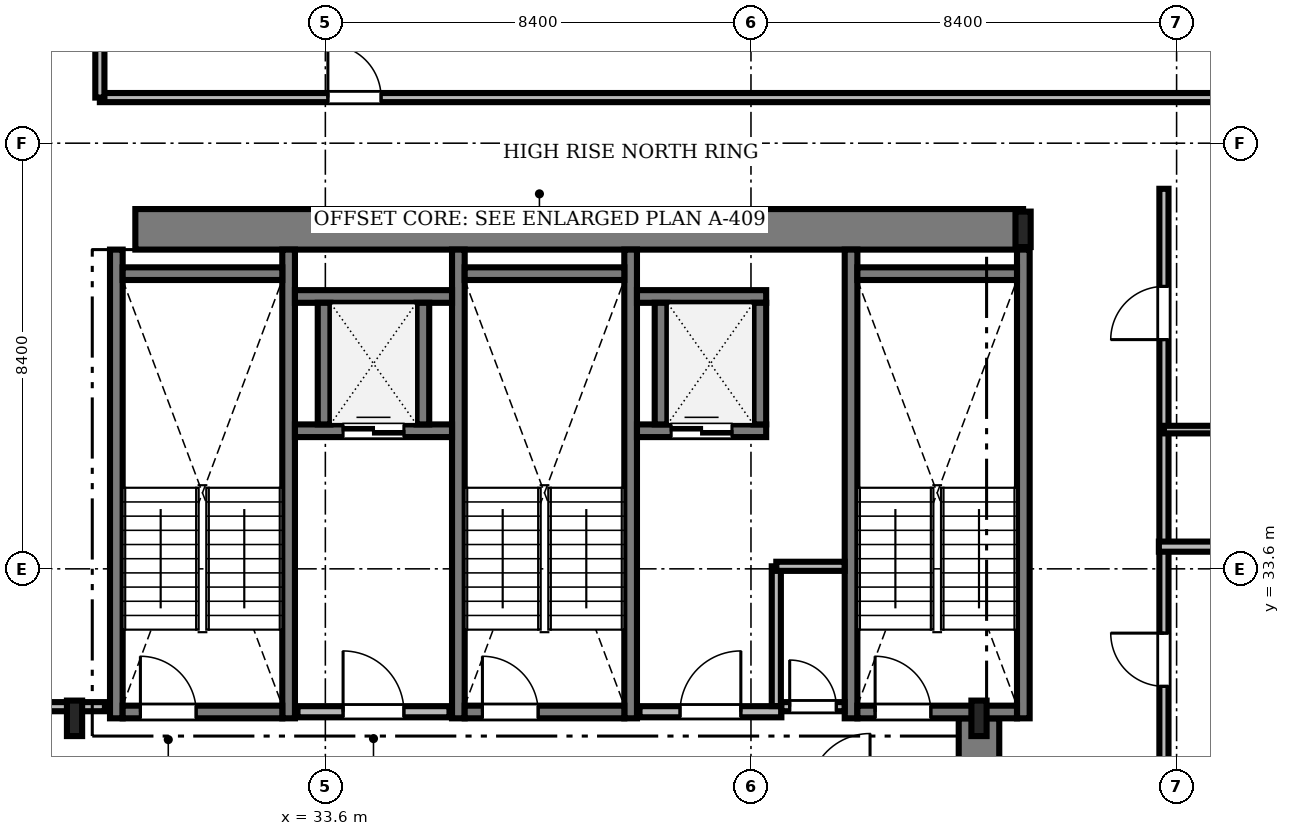
"""IFC4 building model, lengths in metres.
Left out: names, types, materials, properties, quantities, classifications, styles, units other than length and angle.
Written with IfcOpenShell. Run it as: python <this file> out.ifc"""

import sys

from ifc_helpers import new_model, si_unit, direction, frame, frame_2d, origin, origin_2d, place, context, subcontext, project, spatial, rectangle, i_section, extrude, source, transform, mapped, element, fill, save


model = new_model("IFC4")
c1 = context("Model", 3, precision=1e-05, world=origin(), true_north=direction((0.0, 1.0)))
c2 = subcontext(c1, "Body", "Model", "MODEL_VIEW")
j1 = project(units=[si_unit("LENGTHUNIT", "METRE"), si_unit("PLANEANGLEUNIT", "RADIAN")], contexts=[c1])
p1 = place(None, origin())
s1 = spatial("IfcSite", under=j1, at=p1, CompositionType="ELEMENT")
p2 = place(p1, origin())
s2 = spatial("IfcBuilding", under=s1, at=p2, CompositionType="ELEMENT")
p3 = place(p2, frame((0.0, 0.0, 211.05)))
s3 = spatial("IfcBuildingStorey", under=s2, at=p3, CompositionType="ELEMENT", Elevation=211.05)
m1 = source(origin(), c2, "Body", "SweptSolid", [
    extrude(rectangle(XDim=17.52, YDim=0.8, at=frame_2d((8.76, 0.0))), origin(), (0.0, 0.0, 1.0), 3.53),
])
p4 = place(p3, frame((29.85, 40.3, 0.0), z_axis=(0.0, 0.0, 1.0), x_axis=(1.0, 0.0, 0.0)))
e1 = element("IfcWall", 1, at=p4, inside=s3, PredefinedType="SHEAR", context=c2, shape_type="MappedRepresentation", body=[
    mapped(m1, transform((0.0, 0.0, 0.0), scale=1.0)),
])
m2 = source(origin(), c2, "Body", "SweptSolid", [
    extrude(rectangle(XDim=13.15, YDim=0.8, at=frame_2d((6.575, 0.0))), origin(), (0.0, 0.0, 1.0), 3.53),
])
p5 = place(p3, frame((46.5, 17.5, 0.0), z_axis=(0.0, 0.0, 1.0), x_axis=(0.0, 1.0, 0.0)))
e2 = element("IfcWall", 2, at=p5, inside=s3, PredefinedType="SHEAR", context=c2, shape_type="MappedRepresentation", body=[
    mapped(m2, transform((0.0, 0.0, 0.0), scale=1.0)),
])
m3 = source(origin(), c2, "Body", "SweptSolid", [
    extrude(i_section(OverallWidth=0.3, OverallDepth=0.7, WebThickness=0.017, FlangeThickness=0.032, FilletRadius=0.027, at=origin_2d()), origin(), (0.0, 0.0, 1.0), 3.53),
])
for number, where, z_axis, x_axis in (
    (3, (28.65, 30.65, 0.0), (0.0, 0.0, 1.0), (1.0, 0.0, 0.0)),
    (4, (46.5, 30.65, 0.0), (0.0, 0.0, 1.0), (1.0, 0.0, 0.0)),
    (5, (47.37, 40.3, 0.0), (0.0, 0.0, 1.0), (1.0, 0.0, 0.0)),
):
    element("IfcColumn", number, at=place(p3, frame(where, z_axis=z_axis, x_axis=x_axis)), inside=s3, PredefinedType="COLUMN", context=c2, shape_type="MappedRepresentation", body=[
        mapped(m3, transform((0.0, 0.0, 0.0), scale=1.0)),
    ])
m4 = source(origin(), c2, "Body", "SweptSolid", [
    extrude(rectangle(XDim=9.25, YDim=0.25, at=frame_2d((4.625, 0.0))), origin(), (0.0, 0.0, 1.0), 3.55),
])
for number, where, z_axis, x_axis in (
    (6, (29.475, 30.65, 0.0), (0.0, 0.0, 1.0), (0.0, 1.0, 0.0)),
    (7, (32.875, 30.65, 0.0), (0.0, 0.0, 1.0), (0.0, 1.0, 0.0)),
):
    element("IfcWall", number, at=place(p3, frame(where, z_axis=z_axis, x_axis=x_axis)), inside=s3, PredefinedType="SOLIDWALL", context=c2, shape_type="MappedRepresentation", body=[
        mapped(m4, transform((0.0, 0.0, 0.0), scale=1.0)),
    ])
m5 = source(origin(), c2, "Body", "SweptSolid", [
    extrude(rectangle(XDim=3.15, YDim=0.25, at=frame_2d((1.575, 0.0))), origin(), (0.0, 0.0, 1.0), 3.55),
])
p6 = place(p3, frame((29.6, 39.425, 0.0), z_axis=(0.0, 0.0, 1.0), x_axis=(1.0, 0.0, 0.0)))
e8 = element("IfcWall", 8, at=p6, inside=s3, PredefinedType="SOLIDWALL", context=c2, shape_type="MappedRepresentation", body=[
    mapped(m5, transform((0.0, 0.0, 0.0), scale=1.0)),
])
p7 = place(p3, frame((29.6, 30.775, 0.0), z_axis=(0.0, 0.0, 1.0), x_axis=(1.0, 0.0, 0.0)))
e9 = element("IfcWall", 9, at=p7, inside=s3, PredefinedType="SOLIDWALL", context=c2, shape_type="MappedRepresentation", body=[
    mapped(m5, transform((0.0, 0.0, 0.0), scale=1.0)),
])
m6 = source(origin(), c2, "Body", "SweptSolid", [
    extrude(rectangle(XDim=1.1, YDim=2.2, at=frame_2d((0.55, 1.1))), frame((0.0, 0.135, 0.0), z_axis=(0.0, -1.0, 0.0), x_axis=(1.0, 0.0, 0.0)), (0.0, 0.0, 1.0), 0.27),
])
p8 = place(p7, frame((0.35, 0.0, 0.0)))
e10 = element("IfcOpeningElement", 10, at=p8, cuts=e9, PredefinedType="OPENING", context=c2, shape_type="MappedRepresentation", body=[
    mapped(m6, transform((0.0, 0.0, 0.0), scale=1.0)),
])
for number, where, z_axis, x_axis in (
    (11, (36.225, 30.65, 0.0), (0.0, 0.0, 1.0), (0.0, 1.0, 0.0)),
    (12, (39.625, 30.65, 0.0), (0.0, 0.0, 1.0), (0.0, 1.0, 0.0)),
):
    element("IfcWall", number, at=place(p3, frame(where, z_axis=z_axis, x_axis=x_axis)), inside=s3, PredefinedType="SOLIDWALL", context=c2, shape_type="MappedRepresentation", body=[
        mapped(m4, transform((0.0, 0.0, 0.0), scale=1.0)),
    ])
p9 = place(p3, frame((36.35, 39.425, 0.0), z_axis=(0.0, 0.0, 1.0), x_axis=(1.0, 0.0, 0.0)))
e13 = element("IfcWall", 13, at=p9, inside=s3, PredefinedType="SOLIDWALL", context=c2, shape_type="MappedRepresentation", body=[
    mapped(m5, transform((0.0, 0.0, 0.0), scale=1.0)),
])
p10 = place(p3, frame((36.35, 30.775, 0.0), z_axis=(0.0, 0.0, 1.0), x_axis=(1.0, 0.0, 0.0)))
e14 = element("IfcWall", 14, at=p10, inside=s3, PredefinedType="SOLIDWALL", context=c2, shape_type="MappedRepresentation", body=[
    mapped(m5, transform((0.0, 0.0, 0.0), scale=1.0)),
])
p11 = place(p10, frame((0.35, 0.0, 0.0)))
e15 = element("IfcOpeningElement", 15, at=p11, cuts=e14, PredefinedType="OPENING", context=c2, shape_type="MappedRepresentation", body=[
    mapped(m6, transform((0.0, 0.0, 0.0), scale=1.0)),
])
for number, where, z_axis, x_axis in (
    (16, (43.975, 30.65, 0.0), (0.0, 0.0, 1.0), (0.0, 1.0, 0.0)),
    (17, (47.375, 30.65, 0.0), (0.0, 0.0, 1.0), (0.0, 1.0, 0.0)),
):
    element("IfcWall", number, at=place(p3, frame(where, z_axis=z_axis, x_axis=x_axis)), inside=s3, PredefinedType="SOLIDWALL", context=c2, shape_type="MappedRepresentation", body=[
        mapped(m4, transform((0.0, 0.0, 0.0), scale=1.0)),
    ])
p12 = place(p3, frame((44.1, 39.425, 0.0), z_axis=(0.0, 0.0, 1.0), x_axis=(1.0, 0.0, 0.0)))
e18 = element("IfcWall", 18, at=p12, inside=s3, PredefinedType="SOLIDWALL", context=c2, shape_type="MappedRepresentation", body=[
    mapped(m5, transform((0.0, 0.0, 0.0), scale=1.0)),
])
p13 = place(p3, frame((44.1, 30.775, 0.0), z_axis=(0.0, 0.0, 1.0), x_axis=(1.0, 0.0, 0.0)))
e19 = element("IfcWall", 19, at=p13, inside=s3, PredefinedType="SOLIDWALL", context=c2, shape_type="MappedRepresentation", body=[
    mapped(m5, transform((0.0, 0.0, 0.0), scale=1.0)),
])
p14 = place(p13, frame((0.35, 0.0, 0.0)))
e20 = element("IfcOpeningElement", 20, at=p14, cuts=e19, PredefinedType="OPENING", context=c2, shape_type="MappedRepresentation", body=[
    mapped(m6, transform((0.0, 0.0, 0.0), scale=1.0)),
])
m7 = source(origin(), c2, "Body", "SweptSolid", [
    extrude(rectangle(XDim=3.0, YDim=0.22, at=frame_2d((1.5, 0.0))), origin(), (0.0, 0.0, 1.0), 3.53),
])
p15 = place(p3, frame((33.05, 30.78, 0.0), z_axis=(0.0, 0.0, 1.0), x_axis=(1.0, 0.0, 0.0)))
e21 = element("IfcWall", 21, at=p15, inside=s3, PredefinedType="SOLIDWALL", context=c2, shape_type="MappedRepresentation", body=[
    mapped(m7, transform((0.0, 0.0, 0.0), scale=1.0)),
])
m8 = source(origin(), c2, "Body", "SweptSolid", [
    extrude(rectangle(XDim=1.2, YDim=2.2, at=frame_2d((0.6, 1.1))), frame((0.0, 0.12, 0.0), z_axis=(0.0, -1.0, 0.0), x_axis=(1.0, 0.0, 0.0)), (0.0, 0.0, 1.0), 0.24),
])
p16 = place(p15, frame((0.9, 0.0, 0.0)))
e22 = element("IfcOpeningElement", 22, at=p16, cuts=e21, PredefinedType="OPENING", context=c2, shape_type="MappedRepresentation", body=[
    mapped(m8, transform((0.0, 0.0, 0.0), scale=1.0)),
])
m9 = source(origin(), c2, "Body", "SweptSolid", [
    extrude(rectangle(XDim=2.8, YDim=0.22, at=frame_2d((1.4, 0.0))), origin(), (0.0, 0.0, 1.0), 3.53),
])
p17 = place(p3, frame((39.8, 30.78, 0.0), z_axis=(0.0, 0.0, 1.0), x_axis=(1.0, 0.0, 0.0)))
e23 = element("IfcWall", 23, at=p17, inside=s3, PredefinedType="SOLIDWALL", context=c2, shape_type="MappedRepresentation", body=[
    mapped(m9, transform((0.0, 0.0, 0.0), scale=1.0)),
])
p18 = place(p17, frame((0.8, 0.0, 0.0)))
e24 = element("IfcOpeningElement", 24, at=p18, cuts=e23, PredefinedType="OPENING", context=c2, shape_type="MappedRepresentation", body=[
    mapped(m8, transform((0.0, 0.0, 0.0), scale=1.0)),
])
m10 = source(origin(), c2, "Body", "SweptSolid", [
    extrude(rectangle(XDim=3.1, YDim=0.25, at=frame_2d((1.55, 0.0))), origin(), (0.0, 0.0, 1.0), 3.53),
])
p19 = place(p3, frame((33.0, 36.325, 0.0), z_axis=(0.0, 0.0, 1.0), x_axis=(1.0, 0.0, 0.0)))
e25 = element("IfcWall", 25, at=p19, inside=s3, PredefinedType="SOLIDWALL", context=c2, shape_type="MappedRepresentation", body=[
    mapped(m10, transform((0.0, 0.0, 0.0), scale=1.0)),
])
m11 = source(origin(), c2, "Body", "SweptSolid", [
    extrude(rectangle(XDim=1.2, YDim=2.25, at=frame_2d((0.6, 1.125))), frame((0.0, 0.135, 0.0), z_axis=(0.0, -1.0, 0.0), x_axis=(1.0, 0.0, 0.0)), (0.0, 0.0, 1.0), 0.27),
])
p20 = place(p19, frame((0.95, 0.0, 0.0)))
e26 = element("IfcOpeningElement", 26, at=p20, cuts=e25, PredefinedType="OPENING", context=c2, shape_type="MappedRepresentation", body=[
    mapped(m11, transform((0.0, 0.0, 0.0), scale=1.0)),
])
p21 = place(p3, frame((33.0, 38.975, 0.0), z_axis=(0.0, 0.0, 1.0), x_axis=(1.0, 0.0, 0.0)))
e27 = element("IfcWall", 27, at=p21, inside=s3, PredefinedType="SOLIDWALL", context=c2, shape_type="MappedRepresentation", body=[
    mapped(m10, transform((0.0, 0.0, 0.0), scale=1.0)),
])
m12 = source(origin(), c2, "Body", "SweptSolid", [
    extrude(rectangle(XDim=2.4, YDim=0.25, at=frame_2d((1.2, 0.0))), origin(), (0.0, 0.0, 1.0), 3.53),
])
for number, where, z_axis, x_axis in (
    (28, (33.575, 36.45, 0.0), (0.0, 0.0, 1.0), (0.0, 1.0, 0.0)),
    (29, (35.525, 36.45, 0.0), (0.0, 0.0, 1.0), (0.0, 1.0, 0.0)),
):
    element("IfcWall", number, at=place(p3, frame(where, z_axis=z_axis, x_axis=x_axis)), inside=s3, PredefinedType="SOLIDWALL", context=c2, shape_type="MappedRepresentation", body=[
        mapped(m12, transform((0.0, 0.0, 0.0), scale=1.0)),
    ])
m13 = source(origin(), c2, "Body", "SweptSolid", [
    extrude(rectangle(XDim=2.55, YDim=0.25, at=frame_2d((1.275, 0.0))), origin(), (0.0, 0.0, 1.0), 3.53),
])
p22 = place(p3, frame((39.75, 36.325, 0.0), z_axis=(0.0, 0.0, 1.0), x_axis=(1.0, 0.0, 0.0)))
e30 = element("IfcWall", 30, at=p22, inside=s3, PredefinedType="SOLIDWALL", context=c2, shape_type="MappedRepresentation", body=[
    mapped(m13, transform((0.0, 0.0, 0.0), scale=1.0)),
])
p23 = place(p22, frame((0.675, 0.0, 0.0)))
e31 = element("IfcOpeningElement", 31, at=p23, cuts=e30, PredefinedType="OPENING", context=c2, shape_type="MappedRepresentation", body=[
    mapped(m11, transform((0.0, 0.0, 0.0), scale=1.0)),
])
p24 = place(p3, frame((39.75, 38.975, 0.0), z_axis=(0.0, 0.0, 1.0), x_axis=(1.0, 0.0, 0.0)))
e32 = element("IfcWall", 32, at=p24, inside=s3, PredefinedType="SOLIDWALL", context=c2, shape_type="MappedRepresentation", body=[
    mapped(m13, transform((0.0, 0.0, 0.0), scale=1.0)),
])
for number, where, z_axis, x_axis in (
    (33, (40.225, 36.45, 0.0), (0.0, 0.0, 1.0), (0.0, 1.0, 0.0)),
    (34, (42.175, 36.45, 0.0), (0.0, 0.0, 1.0), (0.0, 1.0, 0.0)),
):
    element("IfcWall", number, at=place(p3, frame(where, z_axis=z_axis, x_axis=x_axis)), inside=s3, PredefinedType="SOLIDWALL", context=c2, shape_type="MappedRepresentation", body=[
        mapped(m12, transform((0.0, 0.0, 0.0), scale=1.0)),
    ])
m14 = source(origin(), c2, "Body", "SweptSolid", [
    extrude(rectangle(XDim=28.428, YDim=0.18, at=frame_2d((14.214, 0.0))), origin(), (0.0, 0.0, 1.0), 2.772),
])
p25 = place(p3, frame((29.15, 42.9, 0.0), z_axis=(0.0, 0.0, 1.0), x_axis=(1.0, 0.0, 0.0)))
e35 = element("IfcWall", 35, at=p25, inside=s3, PredefinedType="PARTITIONING", context=c2, shape_type="MappedRepresentation", body=[
    mapped(m14, transform((0.0, 0.0, 0.0), scale=1.0)),
])
m15 = source(origin(), c2, "Body", "SweptSolid", [
    extrude(rectangle(XDim=1.05, YDim=2.2, at=frame_2d((0.525, 1.1))), frame((0.0, 0.1, 0.0), z_axis=(0.0, -1.0, 0.0), x_axis=(1.0, 0.0, 0.0)), (0.0, 0.0, 1.0), 0.2),
])
p26 = place(p25, frame((4.5, 0.0, 0.0)))
e36 = element("IfcOpeningElement", 36, at=p26, cuts=e35, PredefinedType="OPENING", context=c2, shape_type="MappedRepresentation", body=[
    mapped(m15, transform((0.0, 0.0, 0.0), scale=1.0)),
])
m16 = source(origin(), c2, "Body", "SweptSolid", [
    extrude(rectangle(XDim=27.59, YDim=0.18, at=frame_2d((13.795, 0.0))), origin(), (0.0, 0.0, 1.0), 2.972),
])
p27 = place(p3, frame((50.15, 13.51, 0.0), z_axis=(0.0, 0.0, 1.0), x_axis=(0.0, 1.0, 0.0)))
e37 = element("IfcWall", 37, at=p27, inside=s3, PredefinedType="PARTITIONING", context=c2, shape_type="MappedRepresentation", body=[
    mapped(m16, transform((0.0, 0.0, 0.0), scale=1.0)),
])
p28 = place(p27, frame((4.086, 0.0, 0.0)))
e38 = element("IfcOpeningElement", 38, at=p28, cuts=e37, PredefinedType="OPENING", context=c2, shape_type="MappedRepresentation", body=[
    mapped(m15, transform((0.0, 0.0, 0.0), scale=1.0)),
])
p29 = place(p27, frame((9.744, 0.0, 0.0)))
e39 = element("IfcOpeningElement", 39, at=p29, cuts=e37, PredefinedType="OPENING", context=c2, shape_type="MappedRepresentation", body=[
    mapped(m15, transform((0.0, 0.0, 0.0), scale=1.0)),
])
p30 = place(p27, frame((17.771, 0.0, 0.0)))
e40 = element("IfcOpeningElement", 40, at=p30, cuts=e37, PredefinedType="OPENING", context=c2, shape_type="MappedRepresentation", body=[
    mapped(m15, transform((0.0, 0.0, 0.0), scale=1.0)),
])
p31 = place(p27, frame((24.614, 0.0, 0.0)))
e41 = element("IfcOpeningElement", 41, at=p31, cuts=e37, PredefinedType="OPENING", context=c2, shape_type="MappedRepresentation", body=[
    mapped(m15, transform((0.0, 0.0, 0.0), scale=1.0)),
])
m17 = source(origin(), c2, "Body", "SweptSolid", [
    extrude(rectangle(XDim=17.828, YDim=0.18, at=frame_2d((8.914, 0.0))), origin(), (0.0, 0.0, 1.0), 2.772),
])
p32 = place(p3, frame((11.422, 30.88, 0.0), z_axis=(0.0, 0.0, 1.0), x_axis=(1.0, 0.0, 0.0)))
e42 = element("IfcWall", 42, at=p32, inside=s3, PredefinedType="PARTITIONING", context=c2, shape_type="MappedRepresentation", body=[
    mapped(m17, transform((0.0, 0.0, 0.0), scale=1.0)),
])
p33 = place(p32, frame((10.778, 0.0, 0.0)))
e43 = element("IfcOpeningElement", 43, at=p33, cuts=e42, PredefinedType="OPENING", context=c2, shape_type="MappedRepresentation", body=[
    mapped(m15, transform((0.0, 0.0, 0.0), scale=1.0)),
])
m18 = source(origin(), c2, "Body", "SweptSolid", [
    extrude(rectangle(XDim=1.248, YDim=0.18, at=frame_2d((0.624, 0.0))), origin(), (0.0, 0.0, 1.0), 3.53),
])
p34 = place(p3, frame((42.6, 30.88, 0.0), z_axis=(0.0, 0.0, 1.0), x_axis=(1.0, 0.0, 0.0)))
e44 = element("IfcWall", 44, at=p34, inside=s3, PredefinedType="PARTITIONING", context=c2, shape_type="MappedRepresentation", body=[
    mapped(m18, transform((0.0, 0.0, 0.0), scale=1.0)),
])
m19 = source(origin(), c2, "Body", "SweptSolid", [
    extrude(rectangle(XDim=0.92, YDim=2.1, at=frame_2d((0.46, 1.05))), frame((0.0, 0.1, 0.0), z_axis=(0.0, -1.0, 0.0), x_axis=(1.0, 0.0, 0.0)), (0.0, 0.0, 1.0), 0.2),
])
p35 = place(p34, frame((0.164, 0.0, 0.0)))
e45 = element("IfcOpeningElement", 45, at=p35, cuts=e44, PredefinedType="OPENING", context=c2, shape_type="MappedRepresentation", body=[
    mapped(m19, transform((0.0, 0.0, 0.0), scale=1.0)),
])
m20 = source(origin(), c2, "Body", "SweptSolid", [
    extrude(rectangle(XDim=7.528, YDim=0.2, at=frame_2d((3.764, 0.0))), origin(), (0.0, 0.0, 1.0), 2.772),
])
p36 = place(p3, frame((50.05, 34.038, 0.0), z_axis=(0.0, 0.0, 1.0), x_axis=(1.0, 0.0, 0.0)))
e46 = element("IfcWall", 46, at=p36, inside=s3, PredefinedType="PARTITIONING", context=c2, shape_type="MappedRepresentation", body=[
    mapped(m20, transform((0.0, 0.0, 0.0), scale=1.0)),
])
m21 = source(origin(), c2, "Body", "SweptSolid", [
    extrude(rectangle(XDim=5.378, YDim=0.18, at=frame_2d((2.689, 0.0))), origin(), (0.0, 0.0, 1.0), 2.772),
])
p37 = place(p3, frame((29.15, 42.9, 0.0), z_axis=(0.0, 0.0, 1.0), x_axis=(0.0, 1.0, 0.0)))
e47 = element("IfcWall", 47, at=p37, inside=s3, PredefinedType="PARTITIONING", context=c2, shape_type="MappedRepresentation", body=[
    mapped(m21, transform((0.0, 0.0, 0.0), scale=1.0)),
])
m22 = source(origin(), c2, "Body", "SweptSolid", [
    extrude(rectangle(XDim=2.758, YDim=0.18, at=frame_2d((1.379, 0.0))), origin(), (0.0, 0.0, 1.0), 3.53),
])
p38 = place(p3, frame((42.5, 30.892, 0.0), z_axis=(0.0, 0.0, 1.0), x_axis=(0.0, 1.0, 0.0)))
e48 = element("IfcWall", 48, at=p38, inside=s3, PredefinedType="PARTITIONING", context=c2, shape_type="MappedRepresentation", body=[
    mapped(m22, transform((0.0, 0.0, 0.0), scale=1.0)),
])
m23 = source(origin(), c2, "Body", "SweptSolid", [
    extrude(rectangle(XDim=2.36, YDim=0.15, at=frame_2d((1.18, 0.0))), origin(), (0.0, 0.0, 1.0), 3.53),
])
p39 = place(p3, frame((50.15, 36.348, 0.0), z_axis=(0.0, 0.0, 1.0), x_axis=(1.0, 0.0, 0.0)))
e49 = element("IfcWall", 49, at=p39, inside=s3, PredefinedType="PARTITIONING", context=c2, shape_type="MappedRepresentation", body=[
    mapped(m23, transform((0.0, 0.0, 0.0), scale=1.0)),
])
m24 = source(origin(), c2, "Body", "SweptSolid", [
    extrude(rectangle(XDim=1.348, YDim=0.18, at=frame_2d((0.674, 0.0))), origin(), (0.0, 0.0, 1.0), 3.53),
])
p40 = place(p3, frame((42.5, 33.65, 0.0), z_axis=(0.0, 0.0, 1.0), x_axis=(1.0, 0.0, 0.0)))
e50 = element("IfcWall", 50, at=p40, inside=s3, PredefinedType="PARTITIONING", context=c2, shape_type="MappedRepresentation", body=[
    mapped(m24, transform((0.0, 0.0, 0.0), scale=1.0)),
])
m25 = source(origin(), c2, "Body", "SweptSolid", [
    extrude(rectangle(XDim=1.1, YDim=2.2, at=frame_2d((0.55, 1.1))), frame((0.0, 0.025, 0.0), z_axis=(0.0, -1.0, 0.0), x_axis=(1.0, 0.0, 0.0)), (0.0, 0.0, 1.0), 0.05),
])
p41 = place(p8, origin())
e51 = element("IfcDoor", 51, at=p41, inside=s3, OperationType="SINGLE_SWING_LEFT", PredefinedType="DOOR", context=c2, shape_type="MappedRepresentation", body=[
    mapped(m25, transform((0.0, 0.0, 0.0), scale=1.0)),
])
fill(e10, e51)
p42 = place(p11, origin())
e52 = element("IfcDoor", 52, at=p42, inside=s3, OperationType="SINGLE_SWING_LEFT", PredefinedType="DOOR", context=c2, shape_type="MappedRepresentation", body=[
    mapped(m25, transform((0.0, 0.0, 0.0), scale=1.0)),
])
fill(e15, e52)
p43 = place(p14, origin())
e53 = element("IfcDoor", 53, at=p43, inside=s3, OperationType="SINGLE_SWING_LEFT", PredefinedType="DOOR", context=c2, shape_type="MappedRepresentation", body=[
    mapped(m25, transform((0.0, 0.0, 0.0), scale=1.0)),
])
fill(e20, e53)
m26 = source(origin(), c2, "Body", "SweptSolid", [
    extrude(rectangle(XDim=1.2, YDim=2.2, at=frame_2d((0.6, 1.1))), frame((0.0, 0.025, 0.0), z_axis=(0.0, -1.0, 0.0), x_axis=(1.0, 0.0, 0.0)), (0.0, 0.0, 1.0), 0.05),
])
p44 = place(p16, origin())
e54 = element("IfcDoor", 54, at=p44, inside=s3, OperationType="SINGLE_SWING_LEFT", PredefinedType="DOOR", context=c2, shape_type="MappedRepresentation", body=[
    mapped(m26, transform((0.0, 0.0, 0.0), scale=1.0)),
])
fill(e22, e54)
p45 = place(p18, origin())
e55 = element("IfcDoor", 55, at=p45, inside=s3, OperationType="SINGLE_SWING_RIGHT", PredefinedType="DOOR", context=c2, shape_type="MappedRepresentation", body=[
    mapped(m26, transform((0.0, 0.0, 0.0), scale=1.0)),
])
fill(e24, e55)
m27 = source(origin(), c2, "Body", "SweptSolid", [
    extrude(rectangle(XDim=1.2, YDim=2.25, at=frame_2d((0.6, 1.125))), frame((0.0, 0.025, 0.0), z_axis=(0.0, -1.0, 0.0), x_axis=(1.0, 0.0, 0.0)), (0.0, 0.0, 1.0), 0.05),
])
p46 = place(p20, origin())
e56 = element("IfcDoor", 56, at=p46, inside=s3, OperationType="DOUBLE_DOOR_SLIDING", PredefinedType="DOOR", context=c2, shape_type="MappedRepresentation", body=[
    mapped(m27, transform((0.0, 0.0, 0.0), scale=1.0)),
])
fill(e26, e56)
p47 = place(p23, origin())
e57 = element("IfcDoor", 57, at=p47, inside=s3, OperationType="DOUBLE_DOOR_SLIDING", PredefinedType="DOOR", context=c2, shape_type="MappedRepresentation", body=[
    mapped(m27, transform((0.0, 0.0, 0.0), scale=1.0)),
])
fill(e31, e57)
m28 = source(origin(), c2, "Body", "SweptSolid", [
    extrude(rectangle(XDim=1.05, YDim=2.2, at=frame_2d((0.525, 1.1))), frame((0.0, 0.025, 0.0), z_axis=(0.0, -1.0, 0.0), x_axis=(1.0, 0.0, 0.0)), (0.0, 0.0, 1.0), 0.05),
])
p48 = place(p26, origin())
e58 = element("IfcDoor", 58, at=p48, inside=s3, OperationType="SINGLE_SWING_LEFT", PredefinedType="DOOR", context=c2, shape_type="MappedRepresentation", body=[
    mapped(m28, transform((0.0, 0.0, 0.0), scale=1.0)),
])
fill(e36, e58)
p49 = place(p30, origin())
e59 = element("IfcDoor", 59, at=p49, inside=s3, OperationType="SINGLE_SWING_RIGHT", PredefinedType="DOOR", context=c2, shape_type="MappedRepresentation", body=[
    mapped(m28, transform((0.0, 0.0, 0.0), scale=1.0)),
])
fill(e40, e59)
p50 = place(p31, origin())
e60 = element("IfcDoor", 60, at=p50, inside=s3, OperationType="SINGLE_SWING_LEFT", PredefinedType="DOOR", context=c2, shape_type="MappedRepresentation", body=[
    mapped(m28, transform((0.0, 0.0, 0.0), scale=1.0)),
])
fill(e41, e60)
m29 = source(origin(), c2, "Body", "SweptSolid", [
    extrude(rectangle(XDim=0.92, YDim=2.1, at=frame_2d((0.46, 1.05))), frame((0.0, 0.025, 0.0), z_axis=(0.0, -1.0, 0.0), x_axis=(1.0, 0.0, 0.0)), (0.0, 0.0, 1.0), 0.05),
])
p51 = place(p35, origin())
e61 = element("IfcDoor", 61, at=p51, inside=s3, OperationType="SINGLE_SWING_LEFT", PredefinedType="DOOR", context=c2, shape_type="MappedRepresentation", body=[
    mapped(m29, transform((0.0, 0.0, 0.0), scale=1.0)),
])
fill(e45, e61)
save(model, sys.argv[1])
